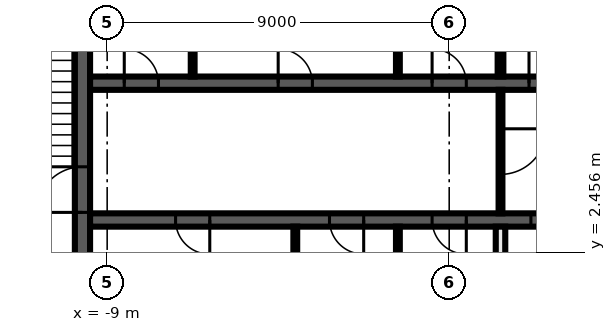
"""IFC4 building model, lengths in metres.
Left out: names, types, materials, properties, quantities, classifications, styles, units other than length and angle.
Written with IfcOpenShell. Run it as: python <this file> out.ifc"""

import sys

from ifc_helpers import new_model, si_unit, direction, frame, frame_2d, origin, place, context, subcontext, project, spatial, rectangle, extrude, element, fill, save


model = new_model("IFC4")
c1 = context("Model", 3, precision=1e-05, world=origin(), true_north=direction((0.0, 1.0)))
c2 = subcontext(c1, "Body", "Model", "MODEL_VIEW")
j1 = project(units=[si_unit("LENGTHUNIT", "METRE"), si_unit("PLANEANGLEUNIT", "RADIAN")], contexts=[c1])
p1 = place(None, origin())
s1 = spatial("IfcSite", under=j1, at=p1, CompositionType="ELEMENT")
p2 = place(p1, origin())
s2 = spatial("IfcBuilding", under=s1, at=p2, CompositionType="ELEMENT")
p3 = place(p2, frame((0.0, 0.0, 306.8)))
s3 = spatial("IfcBuildingStorey", under=s2, at=p3, CompositionType="ELEMENT", Elevation=306.8)
p4 = place(p3, frame((-9.65, 2.3, 0.0), z_axis=(0.0, 0.0, 1.0), x_axis=(0.0, 1.0, 0.0)))
e1 = element("IfcWall", 1, at=p4, inside=s3, PredefinedType="SHEAR", context=c2, shape_type="SweptSolid", body=[
    extrude(rectangle(XDim=7.5, YDim=0.4, at=frame_2d((3.75, 0.0))), origin(), (0.0, 0.0, 1.0), 3.82),
])
p5 = place(p4, frame((1.2, 0.0, 0.0)))
e2 = element("IfcOpeningElement", 2, at=p5, cuts=e1, PredefinedType="OPENING", context=c2, shape_type="SweptSolid", body=[
    extrude(rectangle(XDim=1.2, YDim=2.1, at=frame_2d((0.6, 1.05))), frame((0.0, 0.21, 0.0), z_axis=(0.0, -1.0, 0.0), x_axis=(1.0, 0.0, 0.0)), (0.0, 0.0, 1.0), 0.42),
])
p6 = place(p3, frame((-9.45, 6.9, 0.0), z_axis=(0.0, 0.0, 1.0), x_axis=(1.0, 0.0, 0.0)))
e3 = element("IfcWall", 3, at=p6, inside=s3, PredefinedType="SHEAR", context=c2, shape_type="SweptSolid", body=[
    extrude(rectangle(XDim=18.9, YDim=0.35, at=frame_2d((9.45, 0.0))), origin(), (0.0, 0.0, 1.0), 3.82),
])
p7 = place(p6, frame((11.55, 0.0, 0.0)))
e4 = element("IfcOpeningElement", 4, at=p7, cuts=e3, PredefinedType="OPENING", context=c2, shape_type="SweptSolid", body=[
    extrude(rectangle(XDim=1.2, YDim=2.1, at=frame_2d((0.6, 1.05))), frame((0.0, 0.185, 0.0), z_axis=(0.0, -1.0, 0.0), x_axis=(1.0, 0.0, 0.0)), (0.0, 0.0, 1.0), 0.37),
])
p8 = place(p6, frame((14.3, 0.0, 0.0)))
e5 = element("IfcOpeningElement", 5, at=p8, cuts=e3, PredefinedType="OPENING", context=c2, shape_type="SweptSolid", body=[
    extrude(rectangle(XDim=1.1, YDim=2.1, at=frame_2d((0.55, 1.05))), frame((0.0, 0.185, 0.0), z_axis=(0.0, -1.0, 0.0), x_axis=(1.0, 0.0, 0.0)), (0.0, 0.0, 1.0), 0.37),
])
p9 = place(p6, frame((17.0, 0.0, 0.0)))
e6 = element("IfcOpeningElement", 6, at=p9, cuts=e3, PredefinedType="OPENING", context=c2, shape_type="SweptSolid", body=[
    extrude(rectangle(XDim=1.1, YDim=2.1, at=frame_2d((0.55, 1.05))), frame((0.0, 0.185, 0.0), z_axis=(0.0, -1.0, 0.0), x_axis=(1.0, 0.0, 0.0)), (0.0, 0.0, 1.0), 0.37),
])
p10 = place(p6, frame((0.9, 0.0, 0.0)))
e7 = element("IfcOpeningElement", 7, at=p10, cuts=e3, PredefinedType="OPENING", context=c2, shape_type="SweptSolid", body=[
    extrude(rectangle(XDim=0.9, YDim=2.1, at=frame_2d((0.45, 1.05))), frame((0.0, 0.185, 0.0), z_axis=(0.0, -1.0, 0.0), x_axis=(1.0, 0.0, 0.0)), (0.0, 0.0, 1.0), 0.37),
])
p11 = place(p6, frame((4.95, 0.0, 0.0)))
e8 = element("IfcOpeningElement", 8, at=p11, cuts=e3, PredefinedType="OPENING", context=c2, shape_type="SweptSolid", body=[
    extrude(rectangle(XDim=0.9, YDim=2.1, at=frame_2d((0.45, 1.05))), frame((0.0, 0.185, 0.0), z_axis=(0.0, -1.0, 0.0), x_axis=(1.0, 0.0, 0.0)), (0.0, 0.0, 1.0), 0.37),
])
p12 = place(p6, frame((9.0, 0.0, 0.0)))
e9 = element("IfcOpeningElement", 9, at=p12, cuts=e3, PredefinedType="OPENING", context=c2, shape_type="SweptSolid", body=[
    extrude(rectangle(XDim=0.9, YDim=2.1, at=frame_2d((0.45, 1.05))), frame((0.0, 0.185, 0.0), z_axis=(0.0, -1.0, 0.0), x_axis=(1.0, 0.0, 0.0)), (0.0, 0.0, 1.0), 0.37),
])
p13 = place(p3, frame((9.45, 3.3, 0.0), z_axis=(0.0, 0.0, 1.0), x_axis=(-1.0, 0.0, 0.0)))
e10 = element("IfcWall", 10, at=p13, inside=s3, PredefinedType="SHEAR", context=c2, shape_type="SweptSolid", body=[
    extrude(rectangle(XDim=18.9, YDim=0.35, at=frame_2d((9.45, 0.0))), origin(), (0.0, 0.0, 1.0), 3.82),
])
p14 = place(p13, frame((6.2, 0.0, 0.0)))
e11 = element("IfcOpeningElement", 11, at=p14, cuts=e10, PredefinedType="OPENING", context=c2, shape_type="SweptSolid", body=[
    extrude(rectangle(XDim=1.1, YDim=2.1, at=frame_2d((0.55, 1.05))), frame((0.0, 0.185, 0.0), z_axis=(0.0, -1.0, 0.0), x_axis=(1.0, 0.0, 0.0)), (0.0, 0.0, 1.0), 0.37),
])
p15 = place(p13, frame((3.5, 0.0, 0.0)))
e12 = element("IfcOpeningElement", 12, at=p15, cuts=e10, PredefinedType="OPENING", context=c2, shape_type="SweptSolid", body=[
    extrude(rectangle(XDim=1.1, YDim=2.1, at=frame_2d((0.55, 1.05))), frame((0.0, 0.185, 0.0), z_axis=(0.0, -1.0, 0.0), x_axis=(1.0, 0.0, 0.0)), (0.0, 0.0, 1.0), 0.37),
])
p16 = place(p13, frame((0.9, 0.0, 0.0)))
e13 = element("IfcOpeningElement", 13, at=p16, cuts=e10, PredefinedType="OPENING", context=c2, shape_type="SweptSolid", body=[
    extrude(rectangle(XDim=0.9, YDim=2.1, at=frame_2d((0.45, 1.05))), frame((0.0, 0.185, 0.0), z_axis=(0.0, -1.0, 0.0), x_axis=(1.0, 0.0, 0.0)), (0.0, 0.0, 1.0), 0.37),
])
p17 = place(p13, frame((15.75, 0.0, 0.0)))
e14 = element("IfcOpeningElement", 14, at=p17, cuts=e10, PredefinedType="OPENING", context=c2, shape_type="SweptSolid", body=[
    extrude(rectangle(XDim=0.9, YDim=2.1, at=frame_2d((0.45, 1.05))), frame((0.0, 0.185, 0.0), z_axis=(0.0, -1.0, 0.0), x_axis=(1.0, 0.0, 0.0)), (0.0, 0.0, 1.0), 0.37),
])
p18 = place(p13, frame((11.7, 0.0, 0.0)))
e15 = element("IfcOpeningElement", 15, at=p18, cuts=e10, PredefinedType="OPENING", context=c2, shape_type="SweptSolid", body=[
    extrude(rectangle(XDim=0.9, YDim=2.1, at=frame_2d((0.45, 1.05))), frame((0.0, 0.185, 0.0), z_axis=(0.0, -1.0, 0.0), x_axis=(1.0, 0.0, 0.0)), (0.0, 0.0, 1.0), 0.37),
])
p19 = place(p13, frame((9.0, 0.0, 0.0)))
e16 = element("IfcOpeningElement", 16, at=p19, cuts=e10, PredefinedType="OPENING", context=c2, shape_type="SweptSolid", body=[
    extrude(rectangle(XDim=0.9, YDim=2.1, at=frame_2d((0.45, 1.05))), frame((0.0, 0.185, 0.0), z_axis=(0.0, -1.0, 0.0), x_axis=(1.0, 0.0, 0.0)), (0.0, 0.0, 1.0), 0.37),
])
p20 = place(p3, frame((1.35, 7.075, 0.0), z_axis=(0.0, 0.0, 1.0), x_axis=(0.0, 1.0, 0.0)))
e17 = element("IfcWall", 17, at=p20, inside=s3, PredefinedType="PARTITIONING", context=c2, shape_type="SweptSolid", body=[
    extrude(rectangle(XDim=2.725, YDim=0.15, at=frame_2d((1.363, 0.0))), origin(), (0.0, 0.0, 1.0), 3.82),
])
p21 = place(p3, frame((1.35, 6.725, 0.0), z_axis=(0.0, 0.0, 1.0), x_axis=(0.0, -1.0, 0.0)))
e18 = element("IfcWall", 18, at=p21, inside=s3, PredefinedType="PARTITIONING", context=c2, shape_type="SweptSolid", body=[
    extrude(rectangle(XDim=3.25, YDim=0.1, at=frame_2d((1.625, 0.0))), origin(), (0.0, 0.0, 1.0), 3.82),
])
p22 = place(p21, frame((1.025, 0.0, 0.0)))
e19 = element("IfcOpeningElement", 19, at=p22, cuts=e18, PredefinedType="OPENING", context=c2, shape_type="SweptSolid", body=[
    extrude(rectangle(XDim=1.2, YDim=2.1, at=frame_2d((0.6, 1.05))), frame((0.0, 0.06, 0.0), z_axis=(0.0, -1.0, 0.0), x_axis=(1.0, 0.0, 0.0)), (0.0, 0.0, 1.0), 0.12),
])
p23 = place(p3, frame((1.35, 0.4, 0.0), z_axis=(0.0, 0.0, 1.0), x_axis=(0.0, 1.0, 0.0)))
e20 = element("IfcWall", 20, at=p23, inside=s3, PredefinedType="SOLIDWALL", context=c2, shape_type="SweptSolid", body=[
    extrude(rectangle(XDim=2.725, YDim=0.25, at=frame_2d((1.363, 0.0))), origin(), (0.0, 0.0, 1.0), 3.82),
])
for number, where, z_axis, x_axis in (
    (21, (-1.35, 0.4, 0.0), (0.0, 0.0, 1.0), (0.0, 1.0, 0.0)),
    (22, (-1.35, 7.075, 0.0), (0.0, 0.0, 1.0), (0.0, 1.0, 0.0)),
    (23, (-4.05, 0.4, 0.0), (0.0, 0.0, 1.0), (0.0, 1.0, 0.0)),
    (24, (-6.75, 7.075, 0.0), (0.0, 0.0, 1.0), (0.0, 1.0, 0.0)),
):
    element("IfcWall", number, at=place(p3, frame(where, z_axis=z_axis, x_axis=x_axis)), inside=s3, PredefinedType="PARTITIONING", context=c2, shape_type="SweptSolid", body=[
        extrude(rectangle(XDim=2.725, YDim=0.1, at=frame_2d((1.363, 0.0))), origin(), (0.0, 0.0, 1.0), 3.82),
    ])
p24 = place(p7, origin())
e25 = element("IfcDoor", 25, at=p24, inside=s3, OperationType="SINGLE_SWING_LEFT", PredefinedType="DOOR", context=c2, shape_type="SweptSolid", body=[
    extrude(rectangle(XDim=1.2, YDim=2.1, at=frame_2d((0.6, 1.05))), frame((0.0, 0.025, 0.0), z_axis=(0.0, -1.0, 0.0), x_axis=(1.0, 0.0, 0.0)), (0.0, 0.0, 1.0), 0.05),
])
fill(e4, e25)
p25 = place(p14, origin())
e26 = element("IfcDoor", 26, at=p25, inside=s3, OperationType="DOUBLE_DOOR_SLIDING", PredefinedType="DOOR", context=c2, shape_type="SweptSolid", body=[
    extrude(rectangle(XDim=1.1, YDim=2.1, at=frame_2d((0.55, 1.05))), frame((0.0, 0.025, 0.0), z_axis=(0.0, -1.0, 0.0), x_axis=(1.0, 0.0, 0.0)), (0.0, 0.0, 1.0), 0.05),
])
fill(e11, e26)
p26 = place(p10, origin())
e27 = element("IfcDoor", 27, at=p26, inside=s3, OperationType="SINGLE_SWING_RIGHT", PredefinedType="DOOR", context=c2, shape_type="SweptSolid", body=[
    extrude(rectangle(XDim=0.9, YDim=2.1, at=frame_2d((0.45, 1.05))), frame((0.0, 0.025, 0.0), z_axis=(0.0, -1.0, 0.0), x_axis=(1.0, 0.0, 0.0)), (0.0, 0.0, 1.0), 0.05),
])
fill(e7, e27)
p27 = place(p11, origin())
e28 = element("IfcDoor", 28, at=p27, inside=s3, OperationType="SINGLE_SWING_LEFT", PredefinedType="DOOR", context=c2, shape_type="SweptSolid", body=[
    extrude(rectangle(XDim=0.9, YDim=2.1, at=frame_2d((0.45, 1.05))), frame((0.0, 0.025, 0.0), z_axis=(0.0, -1.0, 0.0), x_axis=(1.0, 0.0, 0.0)), (0.0, 0.0, 1.0), 0.05),
])
fill(e8, e28)
p28 = place(p12, origin())
e29 = element("IfcDoor", 29, at=p28, inside=s3, OperationType="SINGLE_SWING_RIGHT", PredefinedType="DOOR", context=c2, shape_type="SweptSolid", body=[
    extrude(rectangle(XDim=0.9, YDim=2.1, at=frame_2d((0.45, 1.05))), frame((0.0, 0.025, 0.0), z_axis=(0.0, -1.0, 0.0), x_axis=(1.0, 0.0, 0.0)), (0.0, 0.0, 1.0), 0.05),
])
fill(e9, e29)
p29 = place(p17, origin())
e30 = element("IfcDoor", 30, at=p29, inside=s3, OperationType="SINGLE_SWING_LEFT", PredefinedType="DOOR", context=c2, shape_type="SweptSolid", body=[
    extrude(rectangle(XDim=0.9, YDim=2.1, at=frame_2d((0.45, 1.05))), frame((0.0, 0.025, 0.0), z_axis=(0.0, -1.0, 0.0), x_axis=(1.0, 0.0, 0.0)), (0.0, 0.0, 1.0), 0.05),
])
fill(e14, e30)
p30 = place(p18, origin())
e31 = element("IfcDoor", 31, at=p30, inside=s3, OperationType="SINGLE_SWING_RIGHT", PredefinedType="DOOR", context=c2, shape_type="SweptSolid", body=[
    extrude(rectangle(XDim=0.9, YDim=2.1, at=frame_2d((0.45, 1.05))), frame((0.0, 0.025, 0.0), z_axis=(0.0, -1.0, 0.0), x_axis=(1.0, 0.0, 0.0)), (0.0, 0.0, 1.0), 0.05),
])
fill(e15, e31)
p31 = place(p19, origin())
e32 = element("IfcDoor", 32, at=p31, inside=s3, OperationType="SINGLE_SWING_LEFT", PredefinedType="DOOR", context=c2, shape_type="SweptSolid", body=[
    extrude(rectangle(XDim=0.9, YDim=2.1, at=frame_2d((0.45, 1.05))), frame((0.0, 0.025, 0.0), z_axis=(0.0, -1.0, 0.0), x_axis=(1.0, 0.0, 0.0)), (0.0, 0.0, 1.0), 0.05),
])
fill(e16, e32)
p32 = place(p5, origin())
e33 = element("IfcDoor", 33, at=p32, inside=s3, OperationType="SINGLE_SWING_RIGHT", PredefinedType="DOOR", context=c2, shape_type="SweptSolid", body=[
    extrude(rectangle(XDim=1.2, YDim=2.1, at=frame_2d((0.6, 1.05))), frame((0.0, 0.025, 0.0), z_axis=(0.0, -1.0, 0.0), x_axis=(1.0, 0.0, 0.0)), (0.0, 0.0, 1.0), 0.05),
])
fill(e2, e33)
p33 = place(p22, origin())
e34 = element("IfcDoor", 34, at=p33, inside=s3, OperationType="SINGLE_SWING_LEFT", PredefinedType="DOOR", context=c2, shape_type="SweptSolid", body=[
    extrude(rectangle(XDim=1.2, YDim=2.1, at=frame_2d((0.6, 1.05))), frame((0.0, 0.025, 0.0), z_axis=(0.0, -1.0, 0.0), x_axis=(1.0, 0.0, 0.0)), (0.0, 0.0, 1.0), 0.05),
])
fill(e19, e34)
save(model, sys.argv[1])
